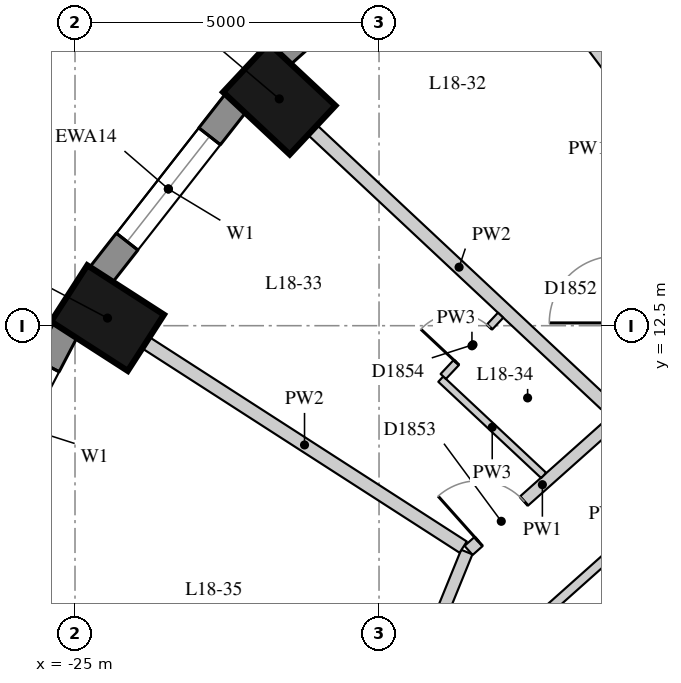
"""IFC4 building model, lengths in metres.
Left out: names, types, materials, properties, quantities, classifications, styles, units other than length and angle.
Written with IfcOpenShell. Run it as: python <this file> out.ifc"""

import sys

from ifc_helpers import new_model, si_unit, direction, frame, frame_2d, origin, origin_2d, place, context, subcontext, project, spatial, rectangle, extrude, element, fill, save


model = new_model("IFC4")
c1 = context("Model", 3, precision=1e-05, world=origin(), true_north=direction((0.0, 1.0)))
c2 = subcontext(c1, "Body", "Model", "MODEL_VIEW")
j1 = project(units=[si_unit("LENGTHUNIT", "METRE"), si_unit("PLANEANGLEUNIT", "RADIAN")], contexts=[c1])
p1 = place(None, origin())
s1 = spatial("IfcSite", under=j1, at=p1, CompositionType="ELEMENT")
p2 = place(p1, origin())
s2 = spatial("IfcBuilding", under=s1, at=p2, CompositionType="ELEMENT")
p3 = place(p2, frame((0.0, 0.0, 67.9)))
s3 = spatial("IfcBuildingStorey", under=s2, at=p3, CompositionType="ELEMENT", Elevation=67.9)
for number, where, z_axis, x_axis in (
    (1, (-21.641, 16.23, 0.0), (0.0, 0.0, 1.0), (-0.73, 0.683, 0.0)),
    (2, (-24.465, 12.625, 0.0), (0.0, 0.0, 1.0), (-0.841, 0.541, 0.0)),
):
    element("IfcColumn", number, at=place(p3, frame(where, z_axis=z_axis, x_axis=x_axis)), inside=s3, PredefinedType="COLUMN", context=c2, shape_type="SweptSolid", body=[
        extrude(rectangle(XDim=1.5, YDim=1.1, at=origin_2d()), origin(), (0.0, 0.0, 1.0), 3.3),
    ])
p4 = place(p3, frame((-18.871, 19.407, 0.0), z_axis=(0.0, 0.0, 1.0), x_axis=(-0.745526233716, -0.66647628228, 0.0)))
e3 = element("IfcWall", 3, at=p4, inside=s3, PredefinedType="SOLIDWALL", context=c2, shape_type="SweptSolid", body=[
    extrude(rectangle(XDim=3.697, YDim=0.45, at=frame_2d((1.848, 0.0))), origin(), (0.0, 0.0, 1.0), 3.02),
])
p5 = place(p4, frame((0.749, 0.0, 0.4)))
e4 = element("IfcOpeningElement", 4, at=p5, cuts=e3, PredefinedType="OPENING", context=c2, shape_type="SweptSolid", body=[
    extrude(rectangle(XDim=2.2, YDim=1.75, at=frame_2d((1.1, 0.875))), frame((0.0, 0.235, 0.0), z_axis=(0.0, -1.0, 0.0), x_axis=(1.0, 0.0, 0.0)), (0.0, 0.0, 1.0), 0.47),
])
p6 = place(p3, frame((-22.352, 16.17, 0.0), z_axis=(0.0, 0.0, 1.0), x_axis=(-0.616661975264, -0.787228053529, 0.0)))
e5 = element("IfcWall", 5, at=p6, inside=s3, PredefinedType="SOLIDWALL", context=c2, shape_type="SweptSolid", body=[
    extrude(rectangle(XDim=3.61, YDim=0.45, at=frame_2d((1.805, 0.0))), origin(), (0.0, 0.0, 1.0), 3.02),
])
p7 = place(p6, frame((0.705, 0.0, 0.4)))
e6 = element("IfcOpeningElement", 6, at=p7, cuts=e5, PredefinedType="OPENING", context=c2, shape_type="SweptSolid", body=[
    extrude(rectangle(XDim=2.2, YDim=1.75, at=frame_2d((1.1, 0.875))), frame((0.0, 0.235, 0.0), z_axis=(0.0, -1.0, 0.0), x_axis=(1.0, 0.0, 0.0)), (0.0, 0.0, 1.0), 0.47),
])
p8 = place(p3, frame((-25.152, 12.437, 0.0), z_axis=(0.0, 0.0, 1.0), x_axis=(-0.462492775226, -0.886623050041, 0.0)))
e7 = element("IfcWall", 7, at=p8, inside=s3, PredefinedType="SOLIDWALL", context=c2, shape_type="SweptSolid", body=[
    extrude(rectangle(XDim=3.532, YDim=0.45, at=frame_2d((1.766, 0.0))), origin(), (0.0, 0.0, 1.0), 3.02),
])
p9 = place(p8, frame((0.666, 0.0, 0.4)))
e8 = element("IfcOpeningElement", 8, at=p9, cuts=e7, PredefinedType="OPENING", context=c2, shape_type="SweptSolid", body=[
    extrude(rectangle(XDim=2.2, YDim=1.75, at=frame_2d((1.1, 0.875))), frame((0.0, 0.235, 0.0), z_axis=(0.0, -1.0, 0.0), x_axis=(1.0, 0.0, 0.0)), (0.0, 0.0, 1.0), 0.47),
])
p10 = place(p3, frame((-20.861, 3.121, 0.0), z_axis=(0.0, 0.0, 1.0), x_axis=(0.377214346955, 0.926125983034, 0.0)))
e9 = element("IfcWall", 9, at=p10, inside=s3, PredefinedType="PARTITIONING", context=c2, shape_type="SweptSolid", body=[
    extrude(rectangle(XDim=6.107, YDim=0.2, at=frame_2d((3.054, 0.0))), origin(), (0.0, 0.0, 1.0), 3.02),
])
p11 = place(p10, frame((2.285, 0.0, 0.0)))
e10 = element("IfcOpeningElement", 10, at=p11, cuts=e9, PredefinedType="OPENING", context=c2, shape_type="SweptSolid", body=[
    extrude(rectangle(XDim=1.1, YDim=2.1, at=frame_2d((0.55, 1.05))), frame((0.0, 0.11, 0.0), z_axis=(0.0, -1.0, 0.0), x_axis=(1.0, 0.0, 0.0)), (0.0, 0.0, 1.0), 0.22),
])
p12 = place(p3, frame((-18.527, 8.804, 0.0), z_axis=(0.0, 0.0, 1.0), x_axis=(0.746493000154, 0.665393267716, 0.0)))
e11 = element("IfcWall", 11, at=p12, inside=s3, PredefinedType="PARTITIONING", context=c2, shape_type="SweptSolid", body=[
    extrude(rectangle(XDim=3.251, YDim=0.2, at=frame_2d((1.625, 0.0))), origin(), (0.0, 0.0, 1.0), 3.02),
])
p13 = place(p12, frame((0.22, 0.0, 0.0)))
e12 = element("IfcOpeningElement", 12, at=p13, cuts=e11, PredefinedType="OPENING", context=c2, shape_type="SweptSolid", body=[
    extrude(rectangle(XDim=1.0, YDim=2.1, at=frame_2d((0.5, 1.05))), frame((0.0, 0.11, 0.0), z_axis=(0.0, -1.0, 0.0), x_axis=(1.0, 0.0, 0.0)), (0.0, 0.0, 1.0), 0.22),
])
p14 = place(p3, frame((-17.185, 7.856, 0.0), z_axis=(0.0, 0.0, 1.0), x_axis=(0.746480516634, 0.665407272493, 0.0)))
e13 = element("IfcWall", 13, at=p14, inside=s3, PredefinedType="PARTITIONING", context=c2, shape_type="SweptSolid", body=[
    extrude(rectangle(XDim=3.541, YDim=0.15, at=frame_2d((1.771, 0.0))), origin(), (0.0, 0.0, 1.0), 3.02),
])
p15 = place(p14, frame((1.221, 0.0, 0.0)))
e14 = element("IfcOpeningElement", 14, at=p15, cuts=e13, PredefinedType="OPENING", context=c2, shape_type="SweptSolid", body=[
    extrude(rectangle(XDim=0.9, YDim=2.1, at=frame_2d((0.45, 1.05))), frame((0.0, 0.085, 0.0), z_axis=(0.0, -1.0, 0.0), x_axis=(1.0, 0.0, 0.0)), (0.0, 0.0, 1.0), 0.17),
])
p16 = place(p3, frame((-17.708, 18.743, 0.0), z_axis=(0.0, 0.0, 1.0), x_axis=(0.601172757903, -0.799119086967, 0.0)))
e15 = element("IfcWall", 15, at=p16, inside=s3, PredefinedType="PARTITIONING", context=c2, shape_type="SweptSolid", body=[
    extrude(rectangle(XDim=3.729, YDim=0.22, at=frame_2d((1.864, 0.0))), origin(), (0.0, 0.0, 1.0), 2.57),
])
p17 = place(p3, frame((-21.093, 15.718, 0.0), z_axis=(0.0, 0.0, 1.0), x_axis=(0.73009284205, -0.683347965525, 0.0)))
e16 = element("IfcWall", 16, at=p17, inside=s3, PredefinedType="PARTITIONING", context=c2, shape_type="SweptSolid", body=[
    extrude(rectangle(XDim=6.602, YDim=0.22, at=frame_2d((3.301, 0.0))), origin(), (0.0, 0.0, 1.0), 3.02),
])
p18 = place(p3, frame((-23.835, 12.219, 0.0), z_axis=(0.0, 0.0, 1.0), x_axis=(0.840743714791, -0.541433288633, 0.0)))
e17 = element("IfcWall", 17, at=p18, inside=s3, PredefinedType="PARTITIONING", context=c2, shape_type="SweptSolid", body=[
    extrude(rectangle(XDim=6.207, YDim=0.22, at=frame_2d((3.104, 0.0))), origin(), (0.0, 0.0, 1.0), 3.02),
])
p19 = place(p3, frame((-17.293, 10.038, 0.0), z_axis=(0.0, 0.0, 1.0), x_axis=(-0.730059424734, 0.683383667026, 0.0)))
e18 = element("IfcWall", 18, at=p19, inside=s3, PredefinedType="PARTITIONING", context=c2, shape_type="SweptSolid", body=[
    extrude(rectangle(XDim=2.317, YDim=0.12, at=frame_2d((1.159, 0.0))), origin(), (0.0, 0.0, 1.0), 3.02),
])
p20 = place(p3, frame((-18.943, 11.665, 0.0), z_axis=(0.0, 0.0, 1.0), x_axis=(0.683364094355, 0.730077745549, 0.0)))
e19 = element("IfcWall", 19, at=p20, inside=s3, PredefinedType="PARTITIONING", context=c2, shape_type="SweptSolid", body=[
    extrude(rectangle(XDim=1.38, YDim=0.12, at=frame_2d((0.69, 0.0))), origin(), (0.0, 0.0, 1.0), 3.02),
])
p21 = place(p20, frame((0.315, 0.0, 0.0)))
e20 = element("IfcOpeningElement", 20, at=p21, cuts=e19, PredefinedType="OPENING", context=c2, shape_type="SweptSolid", body=[
    extrude(rectangle(XDim=0.8, YDim=2.1, at=frame_2d((0.4, 1.05))), frame((0.0, 0.07, 0.0), z_axis=(0.0, -1.0, 0.0), x_axis=(1.0, 0.0, 0.0)), (0.0, 0.0, 1.0), 0.14),
])
p22 = place(p7, origin())
e21 = element("IfcWindow", 21, at=p22, inside=s3, PartitioningType="SINGLE_PANEL", PredefinedType="WINDOW", context=c2, shape_type="SweptSolid", body=[
    extrude(rectangle(XDim=2.2, YDim=1.75, at=frame_2d((1.1, 0.875))), frame((0.0, 0.035, 0.0), z_axis=(0.0, -1.0, 0.0), x_axis=(1.0, 0.0, 0.0)), (0.0, 0.0, 1.0), 0.06),
])
fill(e6, e21)
p23 = place(p13, origin())
e22 = element("IfcDoor", 22, at=p23, inside=s3, OperationType="SINGLE_SWING_LEFT", PredefinedType="DOOR", context=c2, shape_type="SweptSolid", body=[
    extrude(rectangle(XDim=1.0, YDim=2.1, at=frame_2d((0.5, 1.05))), frame((0.0, 0.025, 0.0), z_axis=(0.0, -1.0, 0.0), x_axis=(1.0, 0.0, 0.0)), (0.0, 0.0, 1.0), 0.05),
])
fill(e12, e22)
p24 = place(p21, origin())
e23 = element("IfcDoor", 23, at=p24, inside=s3, OperationType="SINGLE_SWING_LEFT", PredefinedType="DOOR", context=c2, shape_type="SweptSolid", body=[
    extrude(rectangle(XDim=0.8, YDim=2.1, at=frame_2d((0.4, 1.05))), frame((0.0, 0.025, 0.0), z_axis=(0.0, -1.0, 0.0), x_axis=(1.0, 0.0, 0.0)), (0.0, 0.0, 1.0), 0.05),
])
fill(e20, e23)
save(model, sys.argv[1])
